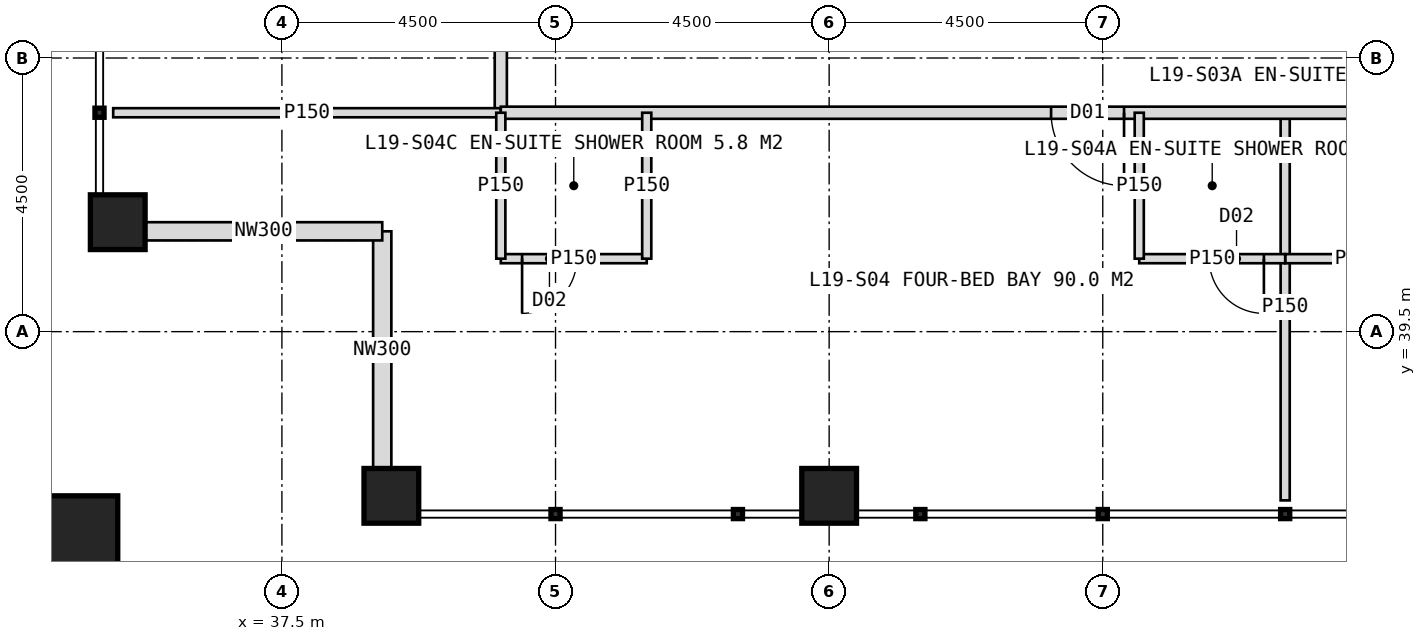
"""IFC4 building model, lengths in metres.
Left out: names, types, materials, properties, quantities, classifications, styles, units other than length and angle.
Written with IfcOpenShell. Run it as: python <this file> out.ifc"""

import sys

from ifc_helpers import new_model, si_unit, direction, frame, frame_2d, origin, origin_2d, place, context, subcontext, project, spatial, rectangle, hollow_rectangle, extrude, element, fill, save


model = new_model("IFC4")
c1 = context("Model", 3, precision=1e-05, world=origin(), true_north=direction((0.0, 1.0)))
c2 = subcontext(c1, "Body", "Model", "MODEL_VIEW")
j1 = project(units=[si_unit("LENGTHUNIT", "METRE"), si_unit("PLANEANGLEUNIT", "RADIAN")], contexts=[c1])
p1 = place(None, origin())
s1 = spatial("IfcSite", under=j1, at=p1, CompositionType="ELEMENT")
p2 = place(p1, origin())
s2 = spatial("IfcBuilding", under=s1, at=p2, CompositionType="ELEMENT")
p3 = place(p2, frame((0.0, 0.0, 83.0)))
s3 = spatial("IfcBuildingStorey", under=s2, at=p3, CompositionType="ELEMENT", Elevation=83.0)
for number, where, z_axis, x_axis in (
    (1, (39.3, 36.8, 0.0), (0.0, 0.0, 1.0), (1.0, 0.0, 0.0)),
    (2, (34.8, 41.3, 0.0), (0.0, 0.0, 1.0), (1.0, 0.0, 0.0)),
    (3, (46.5, 36.8, 0.0), (0.0, 0.0, 1.0), (1.0, 0.0, 0.0)),
):
    element("IfcColumn", number, at=place(p3, frame(where, z_axis=z_axis, x_axis=x_axis)), inside=s3, PredefinedType="COLUMN", context=c2, shape_type="SweptSolid", body=[
        extrude(hollow_rectangle(XDim=0.9, YDim=0.9, WallThickness=0.08, at=origin_2d()), origin(), (0.0, 0.0, 1.0), 4.0),
    ])
p4 = place(p3, frame((33.9, 35.9, 0.0), z_axis=(0.0, 0.0, 1.0), x_axis=(1.0, 0.0, 0.0)))
e4 = element("IfcColumn", 4, at=p4, inside=s3, PredefinedType="COLUMN", context=c2, shape_type="SweptSolid", body=[
    extrude(hollow_rectangle(XDim=1.8, YDim=1.8, WallThickness=0.1, at=origin_2d()), origin(), (0.0, 0.0, 1.0), 4.0),
])
for number, where, z_axis, x_axis in (
    (5, (39.15, 37.25, 0.0), (0.0, 0.0, 1.0), (0.0, 1.0, 0.0)),
    (6, (39.15, 41.15, 0.0), (0.0, 0.0, 1.0), (-1.0, 0.0, 0.0)),
):
    element("IfcWall", number, at=place(p3, frame(where, z_axis=z_axis, x_axis=x_axis)), inside=s3, PredefinedType="ELEMENTEDWALL", context=c2, shape_type="SweptSolid", body=[
        extrude(rectangle(XDim=3.9, YDim=0.3, at=frame_2d((1.95, 0.0))), origin(), (0.0, 0.0, 1.0), 2.95),
    ])
p5 = place(p3, frame((41.1, 43.1, 0.0), z_axis=(0.0, 0.0, 1.0), x_axis=(0.0, 1.0, 0.0)))
e7 = element("IfcWall", 7, at=p5, inside=s3, PredefinedType="PARTITIONING", context=c2, shape_type="SweptSolid", body=[
    extrude(rectangle(XDim=37.8, YDim=0.2, at=frame_2d((18.9, 0.0))), origin(), (0.0, 0.0, 1.0), 3.75),
])
p6 = place(p5, frame((2.45, 0.0, 0.0)))
e8 = element("IfcOpeningElement", 8, at=p6, cuts=e7, PredefinedType="OPENING", context=c2, shape_type="SweptSolid", body=[
    extrude(rectangle(XDim=1.2, YDim=2.2, at=frame_2d((0.6, 1.1))), frame((0.0, 0.11, 0.0), z_axis=(0.0, -1.0, 0.0), x_axis=(1.0, 0.0, 0.0)), (0.0, 0.0, 1.0), 0.22),
])
p7 = place(p5, frame((9.55, 0.0, 0.0)))
e9 = element("IfcOpeningElement", 9, at=p7, cuts=e7, PredefinedType="OPENING", context=c2, shape_type="SweptSolid", body=[
    extrude(rectangle(XDim=1.2, YDim=2.2, at=frame_2d((0.6, 1.1))), frame((0.0, 0.11, 0.0), z_axis=(0.0, -1.0, 0.0), x_axis=(1.0, 0.0, 0.0)), (0.0, 0.0, 1.0), 0.22),
])
p8 = place(p5, frame((15.05, 0.0, 0.0)))
e10 = element("IfcOpeningElement", 10, at=p8, cuts=e7, PredefinedType="OPENING", context=c2, shape_type="SweptSolid", body=[
    extrude(rectangle(XDim=1.2, YDim=2.2, at=frame_2d((0.6, 1.1))), frame((0.0, 0.11, 0.0), z_axis=(0.0, -1.0, 0.0), x_axis=(1.0, 0.0, 0.0)), (0.0, 0.0, 1.0), 0.22),
])
p9 = place(p5, frame((21.55, 0.0, 0.0)))
e11 = element("IfcOpeningElement", 11, at=p9, cuts=e7, PredefinedType="OPENING", context=c2, shape_type="SweptSolid", body=[
    extrude(rectangle(XDim=1.2, YDim=2.2, at=frame_2d((0.6, 1.1))), frame((0.0, 0.11, 0.0), z_axis=(0.0, -1.0, 0.0), x_axis=(1.0, 0.0, 0.0)), (0.0, 0.0, 1.0), 0.22),
])
p10 = place(p5, frame((33.95, 0.0, 0.0)))
e12 = element("IfcOpeningElement", 12, at=p10, cuts=e7, PredefinedType="OPENING", context=c2, shape_type="SweptSolid", body=[
    extrude(rectangle(XDim=1.2, YDim=2.2, at=frame_2d((0.6, 1.1))), frame((0.0, 0.11, 0.0), z_axis=(0.0, -1.0, 0.0), x_axis=(1.0, 0.0, 0.0)), (0.0, 0.0, 1.0), 0.22),
])
for number, where, z_axis, x_axis in (
    (13, (41.1, 43.1, 0.0), (0.0, 0.0, 1.0), (-1.0, 0.0, 0.0)),
    (14, (54.0, 43.1, 0.0), (0.0, 0.0, 1.0), (0.0, -1.0, 0.0)),
):
    element("IfcWall", number, at=place(p3, frame(where, z_axis=z_axis, x_axis=x_axis)), inside=s3, PredefinedType="PARTITIONING", context=c2, shape_type="SweptSolid", body=[
        extrude(rectangle(XDim=6.375, YDim=0.15, at=frame_2d((3.188, 0.0))), origin(), (0.0, 0.0, 1.0), 3.75),
    ])
p11 = place(p3, frame((78.9, 43.1, 0.0), z_axis=(0.0, 0.0, 1.0), x_axis=(-1.0, 0.0, 0.0)))
e15 = element("IfcWall", 15, at=p11, inside=s3, PredefinedType="PARTITIONING", context=c2, shape_type="SweptSolid", body=[
    extrude(rectangle(XDim=37.8, YDim=0.2, at=frame_2d((18.9, 0.0))), origin(), (0.0, 0.0, 1.0), 3.75),
])
p12 = place(p11, frame((6.05, 0.0, 0.0)))
e16 = element("IfcOpeningElement", 16, at=p12, cuts=e15, PredefinedType="OPENING", context=c2, shape_type="SweptSolid", body=[
    extrude(rectangle(XDim=1.2, YDim=2.2, at=frame_2d((0.6, 1.1))), frame((0.0, 0.11, 0.0), z_axis=(0.0, -1.0, 0.0), x_axis=(1.0, 0.0, 0.0)), (0.0, 0.0, 1.0), 0.22),
])
p13 = place(p11, frame((12.55, 0.0, 0.0)))
e17 = element("IfcOpeningElement", 17, at=p13, cuts=e15, PredefinedType="OPENING", context=c2, shape_type="SweptSolid", body=[
    extrude(rectangle(XDim=1.2, YDim=2.2, at=frame_2d((0.6, 1.1))), frame((0.0, 0.11, 0.0), z_axis=(0.0, -1.0, 0.0), x_axis=(1.0, 0.0, 0.0)), (0.0, 0.0, 1.0), 0.22),
])
p14 = place(p11, frame((21.05, 0.0, 0.0)))
e18 = element("IfcOpeningElement", 18, at=p14, cuts=e15, PredefinedType="OPENING", context=c2, shape_type="SweptSolid", body=[
    extrude(rectangle(XDim=1.2, YDim=2.2, at=frame_2d((0.6, 1.1))), frame((0.0, 0.11, 0.0), z_axis=(0.0, -1.0, 0.0), x_axis=(1.0, 0.0, 0.0)), (0.0, 0.0, 1.0), 0.22),
])
p15 = place(p11, frame((27.55, 0.0, 0.0)))
e19 = element("IfcOpeningElement", 19, at=p15, cuts=e15, PredefinedType="OPENING", context=c2, shape_type="SweptSolid", body=[
    extrude(rectangle(XDim=1.2, YDim=2.2, at=frame_2d((0.6, 1.1))), frame((0.0, 0.11, 0.0), z_axis=(0.0, -1.0, 0.0), x_axis=(1.0, 0.0, 0.0)), (0.0, 0.0, 1.0), 0.22),
])
p16 = place(p3, frame((56.4, 40.7, 0.0), z_axis=(0.0, 0.0, 1.0), x_axis=(-1.0, 0.0, 0.0)))
e20 = element("IfcWall", 20, at=p16, inside=s3, PredefinedType="PARTITIONING", context=c2, shape_type="SweptSolid", body=[
    extrude(rectangle(XDim=2.4, YDim=0.15, at=frame_2d((1.2, 0.0))), origin(), (0.0, 0.0, 1.0), 3.75),
])
p17 = place(p16, frame((0.35, 0.0, 0.0)))
e21 = element("IfcOpeningElement", 21, at=p17, cuts=e20, PredefinedType="OPENING", context=c2, shape_type="SweptSolid", body=[
    extrude(rectangle(XDim=0.9, YDim=2.1, at=frame_2d((0.45, 1.05))), frame((0.0, 0.085, 0.0), z_axis=(0.0, -1.0, 0.0), x_axis=(1.0, 0.0, 0.0)), (0.0, 0.0, 1.0), 0.17),
])
p18 = place(p3, frame((54.0, 40.7, 0.0), z_axis=(0.0, 0.0, 1.0), x_axis=(-1.0, 0.0, 0.0)))
e22 = element("IfcWall", 22, at=p18, inside=s3, PredefinedType="PARTITIONING", context=c2, shape_type="SweptSolid", body=[
    extrude(rectangle(XDim=2.4, YDim=0.15, at=frame_2d((1.2, 0.0))), origin(), (0.0, 0.0, 1.0), 3.75),
])
p19 = place(p18, frame((0.35, 0.0, 0.0)))
e23 = element("IfcOpeningElement", 23, at=p19, cuts=e22, PredefinedType="OPENING", context=c2, shape_type="SweptSolid", body=[
    extrude(rectangle(XDim=0.9, YDim=2.1, at=frame_2d((0.45, 1.05))), frame((0.0, 0.085, 0.0), z_axis=(0.0, -1.0, 0.0), x_axis=(1.0, 0.0, 0.0)), (0.0, 0.0, 1.0), 0.17),
])
p20 = place(p3, frame((51.6, 43.1, 0.0), z_axis=(0.0, 0.0, 1.0), x_axis=(0.0, -1.0, 0.0)))
e24 = element("IfcWall", 24, at=p20, inside=s3, PredefinedType="PARTITIONING", context=c2, shape_type="SweptSolid", body=[
    extrude(rectangle(XDim=2.4, YDim=0.15, at=frame_2d((1.2, 0.0))), origin(), (0.0, 0.0, 1.0), 3.75),
])
p21 = place(p3, frame((43.5, 40.7, 0.0), z_axis=(0.0, 0.0, 1.0), x_axis=(-1.0, 0.0, 0.0)))
e25 = element("IfcWall", 25, at=p21, inside=s3, PredefinedType="PARTITIONING", context=c2, shape_type="SweptSolid", body=[
    extrude(rectangle(XDim=2.4, YDim=0.15, at=frame_2d((1.2, 0.0))), origin(), (0.0, 0.0, 1.0), 3.75),
])
p22 = place(p21, frame((1.15, 0.0, 0.0)))
e26 = element("IfcOpeningElement", 26, at=p22, cuts=e25, PredefinedType="OPENING", context=c2, shape_type="SweptSolid", body=[
    extrude(rectangle(XDim=0.9, YDim=2.1, at=frame_2d((0.45, 1.05))), frame((0.0, 0.085, 0.0), z_axis=(0.0, -1.0, 0.0), x_axis=(1.0, 0.0, 0.0)), (0.0, 0.0, 1.0), 0.17),
])
for number, where, z_axis, x_axis in (
    (27, (43.5, 43.1, 0.0), (0.0, 0.0, 1.0), (0.0, -1.0, 0.0)),
    (28, (41.1, 43.1, 0.0), (0.0, 0.0, 1.0), (0.0, -1.0, 0.0)),
):
    element("IfcWall", number, at=place(p3, frame(where, z_axis=z_axis, x_axis=x_axis)), inside=s3, PredefinedType="PARTITIONING", context=c2, shape_type="SweptSolid", body=[
        extrude(rectangle(XDim=2.4, YDim=0.15, at=frame_2d((1.2, 0.0))), origin(), (0.0, 0.0, 1.0), 3.75),
    ])
p23 = place(p15, origin())
e29 = element("IfcDoor", 29, at=p23, inside=s3, OperationType="SINGLE_SWING_LEFT", PredefinedType="DOOR", context=c2, shape_type="SweptSolid", body=[
    extrude(rectangle(XDim=1.2, YDim=2.2, at=frame_2d((0.6, 1.1))), frame((0.0, 0.025, 0.0), z_axis=(0.0, -1.0, 0.0), x_axis=(1.0, 0.0, 0.0)), (0.0, 0.0, 1.0), 0.05),
])
fill(e19, e29)
p24 = place(p19, origin())
e30 = element("IfcDoor", 30, at=p24, inside=s3, OperationType="SINGLE_SWING_LEFT", PredefinedType="DOOR", context=c2, shape_type="SweptSolid", body=[
    extrude(rectangle(XDim=0.9, YDim=2.1, at=frame_2d((0.45, 1.05))), frame((0.0, 0.025, 0.0), z_axis=(0.0, -1.0, 0.0), x_axis=(1.0, 0.0, 0.0)), (0.0, 0.0, 1.0), 0.05),
])
fill(e23, e30)
p25 = place(p22, origin())
e31 = element("IfcDoor", 31, at=p25, inside=s3, OperationType="SINGLE_SWING_RIGHT", PredefinedType="DOOR", context=c2, shape_type="SweptSolid", body=[
    extrude(rectangle(XDim=0.9, YDim=2.1, at=frame_2d((0.45, 1.05))), frame((0.0, 0.025, 0.0), z_axis=(0.0, -1.0, 0.0), x_axis=(1.0, 0.0, 0.0)), (0.0, 0.0, 1.0), 0.05),
])
fill(e26, e31)
save(model, sys.argv[1])
